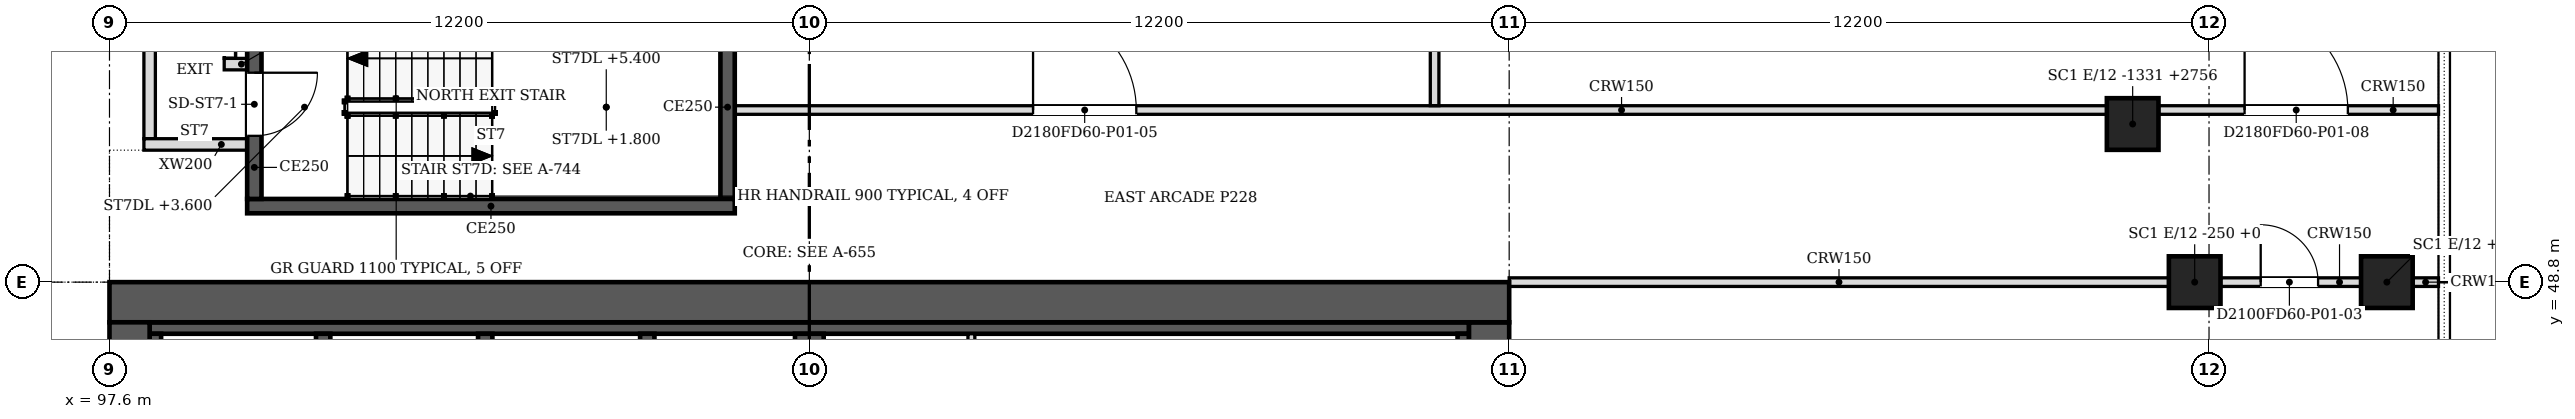
"""IFC4 building model, lengths in metres.
Left out: names, types, materials, properties, quantities, classifications, styles, units other than length and angle.
Written with IfcOpenShell. Run it as: python <this file> out.ifc"""

import sys

from ifc_helpers import new_model, si_unit, direction, frame, frame_2d, origin, origin_2d, place, context, subcontext, project, spatial, rectangle, extrude, source, transform, mapped, element, fill, save


model = new_model("IFC4")
c1 = context("Model", 3, precision=1e-05, world=origin(), true_north=direction((0.0, 1.0)))
c2 = subcontext(c1, "Body", "Model", "MODEL_VIEW")
j1 = project(units=[si_unit("LENGTHUNIT", "METRE"), si_unit("PLANEANGLEUNIT", "RADIAN")], contexts=[c1])
p1 = place(None, origin())
s1 = spatial("IfcSite", under=j1, at=p1, CompositionType="ELEMENT")
p2 = place(p1, origin())
s2 = spatial("IfcBuilding", under=s1, at=p2, CompositionType="ELEMENT")
p3 = place(p2, origin())
s3 = spatial("IfcBuildingStorey", under=s2, at=p3, CompositionType="ELEMENT", Elevation=0.0)
for number, where, z_axis, x_axis in (
    (1, (133.95, 48.8, 0.0), (0.0, 0.0, 1.0), (1.0, 0.0, 0.0)),
    (2, (132.869, 51.556, 0.0), (0.0, 0.0, 1.0), (1.0, 0.0, 0.0)),
    (3, (137.3, 48.8, 0.0), (0.0, 0.0, 1.0), (1.0, 0.0, 0.0)),
):
    element("IfcColumn", number, at=place(p3, frame(where, z_axis=z_axis, x_axis=x_axis)), inside=s3, PredefinedType="COLUMN", context=c2, shape_type="SweptSolid", body=[
        extrude(rectangle(XDim=0.9, YDim=0.9, at=origin_2d()), origin(), (0.0, 0.0, 1.0), 6.95),
    ])
p4 = place(p3, frame((97.95, 37.3, 0.0), z_axis=(0.0, 0.0, 1.0), x_axis=(0.0, 1.0, 0.0)))
e4 = element("IfcWall", 4, at=p4, inside=s3, PredefinedType="SHEAR", context=c2, shape_type="SweptSolid", body=[
    extrude(rectangle(XDim=10.8, YDim=0.7, at=frame_2d((5.4, 0.0))), origin(), (0.0, 0.0, 1.0), 7.2),
])
m1 = source(origin(), c2, "Body", "SweptSolid", [
    extrude(rectangle(XDim=2.1, YDim=2.4, at=frame_2d((1.05, 1.2))), frame((0.0, 0.36, 0.0), z_axis=(0.0, -1.0, 0.0), x_axis=(1.0, 0.0, 0.0)), (0.0, 0.0, 1.0), 0.72),
])
p5 = place(p4, frame((4.5, 0.0, 0.0)))
e5 = element("IfcOpeningElement", 5, at=p5, cuts=e4, PredefinedType="OPENING", context=c2, shape_type="MappedRepresentation", body=[
    mapped(m1, transform((0.0, 0.0, 0.0), scale=1.0)),
])
p6 = place(p3, frame((97.6, 48.45, 0.0), z_axis=(0.0, 0.0, 1.0), x_axis=(1.0, 0.0, 0.0)))
e6 = element("IfcWall", 6, at=p6, inside=s3, PredefinedType="SHEAR", context=c2, shape_type="SweptSolid", body=[
    extrude(rectangle(XDim=24.4, YDim=0.7, at=frame_2d((12.2, 0.0))), origin(), (0.0, 0.0, 1.0), 7.2),
])
p7 = place(p3, frame((121.65, 48.1, 0.0), z_axis=(0.0, 0.0, 1.0), x_axis=(0.0, -1.0, 0.0)))
e7 = element("IfcWall", 7, at=p7, inside=s3, PredefinedType="SHEAR", context=c2, shape_type="SweptSolid", body=[
    extrude(rectangle(XDim=10.8, YDim=0.7, at=frame_2d((5.4, 0.0))), origin(), (0.0, 0.0, 1.0), 7.2),
])
m2 = source(origin(), c2, "Body", "SweptSolid", [
    extrude(rectangle(XDim=2.4, YDim=2.1, at=frame_2d((1.2, 1.05))), frame((0.0, 0.36, 0.0), z_axis=(0.0, -1.0, 0.0), x_axis=(1.0, 0.0, 0.0)), (0.0, 0.0, 1.0), 0.72),
])
p8 = place(p7, frame((3.95, 0.0, 0.0)))
e8 = element("IfcOpeningElement", 8, at=p8, cuts=e7, PredefinedType="OPENING", context=c2, shape_type="MappedRepresentation", body=[
    mapped(m2, transform((0.0, 0.0, 0.0), scale=1.0)),
])
p9 = place(p3, frame((98.3, 48.0, 0.0), z_axis=(0.0, 0.0, 1.0), x_axis=(1.0, 0.0, 0.0)))
e9 = element("IfcWall", 9, at=p9, inside=s3, PredefinedType="SOLIDWALL", context=c2, shape_type="SweptSolid", body=[
    extrude(rectangle(XDim=23.0, YDim=0.2, at=frame_2d((11.5, 0.0))), origin(), (0.0, 0.0, 1.0), 7.2),
])
p10 = place(p3, frame((98.4, 43.9, 0.0), z_axis=(0.0, 0.0, 1.0), x_axis=(0.0, 1.0, 0.0)))
e10 = element("IfcWall", 10, at=p10, inside=s3, PredefinedType="SOLIDWALL", context=c2, shape_type="SweptSolid", body=[
    extrude(rectangle(XDim=4.0, YDim=0.2, at=frame_2d((2.0, 0.0))), origin(), (0.0, 0.0, 1.0), 7.2),
])
p11 = place(p3, frame((121.2, 44.15, 0.0), z_axis=(0.0, 0.0, 1.0), x_axis=(0.0, 1.0, 0.0)))
e11 = element("IfcWall", 11, at=p11, inside=s3, PredefinedType="SOLIDWALL", context=c2, shape_type="SweptSolid", body=[
    extrude(rectangle(XDim=3.75, YDim=0.2, at=frame_2d((1.875, 0.0))), origin(), (0.0, 0.0, 1.0), 7.2),
])
p12 = place(p3, frame((109.8, 45.2, 0.0), z_axis=(0.0, 0.0, 1.0), x_axis=(0.0, 1.0, 0.0)))
e12 = element("IfcWall", 12, at=p12, inside=s3, PredefinedType="SHEAR", context=c2, shape_type="SweptSolid", body=[
    extrude(rectangle(XDim=2.7, YDim=0.5, at=frame_2d((1.35, 0.0))), origin(), (0.0, 0.0, 1.0), 7.2),
])
for number, where, z_axis, x_axis in (
    (13, (101.325, 45.325, 0.0), (0.0, 0.0, 1.0), (0.0, 1.0, 0.0)),
    (14, (104.15, 45.325, 0.0), (0.0, 0.0, 1.0), (0.0, 1.0, 0.0)),
    (15, (106.975, 45.325, 0.0), (0.0, 0.0, 1.0), (0.0, 1.0, 0.0)),
):
    element("IfcWall", number, at=place(p3, frame(where, z_axis=z_axis, x_axis=x_axis)), inside=s3, PredefinedType="SOLIDWALL", context=c2, shape_type="SweptSolid", body=[
        extrude(rectangle(XDim=2.575, YDim=0.25, at=frame_2d((1.288, 0.0))), origin(), (0.0, 0.0, 1.0), 7.2),
    ])
p13 = place(p3, frame((112.625, 45.26, 0.0), z_axis=(0.0, 0.0, 1.0), x_axis=(0.0, 1.0, 0.0)))
e16 = element("IfcWall", 16, at=p13, inside=s3, PredefinedType="PARTITIONING", context=c2, shape_type="SweptSolid", body=[
    extrude(rectangle(XDim=2.64, YDim=0.12, at=frame_2d((1.32, 0.0))), origin(), (0.0, 0.0, 1.0), 6.95),
])
p14 = place(p3, frame((108.5, 50.125, 0.0), z_axis=(0.0, 0.0, 1.0), x_axis=(-1.0, 0.0, 0.0)))
e17 = element("IfcWall", 17, at=p14, inside=s3, PredefinedType="SOLIDWALL", context=c2, shape_type="SweptSolid", body=[
    extrude(rectangle(XDim=8.5, YDim=0.25, at=frame_2d((4.25, 0.0))), origin(), (0.0, 0.0, 1.0), 7.2),
])
p15 = place(p3, frame((100.125, 50.25, 0.0), z_axis=(0.0, 0.0, 1.0), x_axis=(0.0, 1.0, 0.0)))
e18 = element("IfcWall", 18, at=p15, inside=s3, PredefinedType="SOLIDWALL", context=c2, shape_type="SweptSolid", body=[
    extrude(rectangle(XDim=3.2, YDim=0.25, at=frame_2d((1.6, 0.0))), origin(), (0.0, 0.0, 1.0), 7.2),
])
m3 = source(origin(), c2, "Body", "SweptSolid", [
    extrude(rectangle(XDim=1.1, YDim=2.1, at=frame_2d((0.55, 1.05))), frame((0.0, 0.135, 0.0), z_axis=(0.0, -1.0, 0.0), x_axis=(1.0, 0.0, 0.0)), (0.0, 0.0, 1.0), 0.27),
])
p16 = place(p15, frame((1.1, 0.0, 0.0)))
e19 = element("IfcOpeningElement", 19, at=p16, cuts=e18, PredefinedType="OPENING", context=c2, shape_type="MappedRepresentation", body=[
    mapped(m3, transform((0.0, 0.0, 0.0), scale=1.0)),
])
p17 = place(p3, frame((108.375, 53.45, 0.0), z_axis=(0.0, 0.0, 1.0), x_axis=(0.0, -1.0, 0.0)))
e20 = element("IfcWall", 20, at=p17, inside=s3, PredefinedType="SOLIDWALL", context=c2, shape_type="SweptSolid", body=[
    extrude(rectangle(XDim=3.2, YDim=0.25, at=frame_2d((1.6, 0.0))), origin(), (0.0, 0.0, 1.0), 7.2),
])
p18 = place(p3, frame((98.3, 51.3, 0.0), z_axis=(0.0, 0.0, 1.0), x_axis=(0.0, 1.0, 0.0)))
e21 = element("IfcWall", 21, at=p18, inside=s3, PredefinedType="PARTITIONING", context=c2, shape_type="SweptSolid", body=[
    extrude(rectangle(XDim=7.4, YDim=0.2, at=frame_2d((3.7, 0.0))), origin(), (0.0, 0.0, 1.0), 6.115),
])
p19 = place(p3, frame((98.2, 51.2, 0.0), z_axis=(0.0, 0.0, 1.0), x_axis=(1.0, 0.0, 0.0)))
e22 = element("IfcWall", 22, at=p19, inside=s3, PredefinedType="PARTITIONING", context=c2, shape_type="SweptSolid", body=[
    extrude(rectangle(XDim=1.8, YDim=0.2, at=frame_2d((0.9, 0.0))), origin(), (0.0, 0.0, 1.0), 6.115),
])
p20 = place(p3, frame((99.7, 52.7, 0.0), z_axis=(0.0, 0.0, 1.0), x_axis=(0.0, 1.0, 0.0)))
e23 = element("IfcWall", 23, at=p20, inside=s3, PredefinedType="PARTITIONING", context=c2, shape_type="SweptSolid", body=[
    extrude(rectangle(XDim=6.0, YDim=0.2, at=frame_2d((3.0, 0.0))), origin(), (0.0, 0.0, 1.0), 6.115),
])
p21 = place(p3, frame((99.6, 52.6, 0.0), z_axis=(0.0, 0.0, 1.0), x_axis=(1.0, 0.0, 0.0)))
e24 = element("IfcWall", 24, at=p21, inside=s3, PredefinedType="PARTITIONING", context=c2, shape_type="SweptSolid", body=[
    extrude(rectangle(XDim=0.4, YDim=0.2, at=frame_2d((0.2, 0.0))), origin(), (0.0, 0.0, 1.0), 6.115),
])
p22 = place(p3, frame((122.0, 48.8, 0.0), z_axis=(0.0, 0.0, 1.0), x_axis=(1.0, 0.0, 0.0)))
e25 = element("IfcWall", 25, at=p22, inside=s3, PredefinedType="PARTITIONING", context=c2, shape_type="SweptSolid", body=[
    extrude(rectangle(XDim=11.499, YDim=0.15, at=frame_2d((5.75, 0.0))), origin(), (0.0, 0.0, 1.0), 6.115),
])
p23 = place(p3, frame((136.849, 48.8, 0.0), z_axis=(0.0, 0.0, 1.0), x_axis=(-1.0, 0.0, 0.0)))
e26 = element("IfcWall", 26, at=p23, inside=s3, PredefinedType="PARTITIONING", context=c2, shape_type="SweptSolid", body=[
    extrude(rectangle(XDim=2.448, YDim=0.15, at=frame_2d((1.224, 0.0))), origin(), (0.0, 0.0, 1.0), 6.115),
])
m4 = source(origin(), c2, "Body", "SweptSolid", [
    extrude(rectangle(XDim=1.0, YDim=2.1, at=frame_2d((0.5, 1.05))), frame((0.0, 0.085, 0.0), z_axis=(0.0, -1.0, 0.0), x_axis=(1.0, 0.0, 0.0)), (0.0, 0.0, 1.0), 0.17),
])
p24 = place(p23, frame((0.748, 0.0, 0.0)))
e27 = element("IfcOpeningElement", 27, at=p24, cuts=e26, PredefinedType="OPENING", context=c2, shape_type="MappedRepresentation", body=[
    mapped(m4, transform((0.0, 0.0, 0.0), scale=1.0)),
])
p25 = place(p3, frame((137.751, 48.8, 0.0), z_axis=(0.0, 0.0, 1.0), x_axis=(1.0, 0.0, 0.0)))
e28 = element("IfcWall", 28, at=p25, inside=s3, PredefinedType="PARTITIONING", context=c2, shape_type="SweptSolid", body=[
    extrude(rectangle(XDim=0.449, YDim=0.15, at=frame_2d((0.225, 0.0))), origin(), (0.0, 0.0, 1.0), 6.115),
])
p26 = place(p3, frame((108.5, 51.8, 0.0), z_axis=(0.0, 0.0, 1.0), x_axis=(1.0, 0.0, 0.0)))
e29 = element("IfcWall", 29, at=p26, inside=s3, PredefinedType="PARTITIONING", context=c2, shape_type="SweptSolid", body=[
    extrude(rectangle(XDim=23.918, YDim=0.15, at=frame_2d((11.959, 0.0))), origin(), (0.0, 0.0, 1.0), 6.115),
])
m5 = source(origin(), c2, "Body", "SweptSolid", [
    extrude(rectangle(XDim=1.8, YDim=2.1, at=frame_2d((0.9, 1.05))), frame((0.0, 0.085, 0.0), z_axis=(0.0, -1.0, 0.0), x_axis=(1.0, 0.0, 0.0)), (0.0, 0.0, 1.0), 0.17),
])
p27 = place(p26, frame((5.2, 0.0, 0.0)))
e30 = element("IfcOpeningElement", 30, at=p27, cuts=e29, PredefinedType="OPENING", context=c2, shape_type="MappedRepresentation", body=[
    mapped(m5, transform((0.0, 0.0, 0.0), scale=1.0)),
])
p28 = place(p3, frame((133.32, 51.8, 0.0), z_axis=(0.0, 0.0, 1.0), x_axis=(1.0, 0.0, 0.0)))
e31 = element("IfcWall", 31, at=p28, inside=s3, PredefinedType="PARTITIONING", context=c2, shape_type="SweptSolid", body=[
    extrude(rectangle(XDim=4.88, YDim=0.15, at=frame_2d((2.44, 0.0))), origin(), (0.0, 0.0, 1.0), 6.115),
])
p29 = place(p28, frame((1.5, 0.0, 0.0)))
e32 = element("IfcOpeningElement", 32, at=p29, cuts=e31, PredefinedType="OPENING", context=c2, shape_type="MappedRepresentation", body=[
    mapped(m5, transform((0.0, 0.0, 0.0), scale=1.0)),
])
p30 = place(p3, frame((120.7, 51.876, 0.0), z_axis=(0.0, 0.0, 1.0), x_axis=(0.0, 1.0, 0.0)))
e33 = element("IfcWall", 33, at=p30, inside=s3, PredefinedType="PARTITIONING", context=c2, shape_type="SweptSolid", body=[
    extrude(rectangle(XDim=3.823, YDim=0.15, at=frame_2d((1.912, 0.0))), origin(), (0.0, 0.0, 1.0), 6.115),
])
m6 = source(origin(), c2, "Body", "SweptSolid", [
    extrude(rectangle(XDim=1.1, YDim=2.1, at=frame_2d((0.55, 1.05))), frame((0.0, 0.025, 0.0), z_axis=(0.0, -1.0, 0.0), x_axis=(1.0, 0.0, 0.0)), (0.0, 0.0, 1.0), 0.05),
])
p31 = place(p16, origin())
e34 = element("IfcDoor", 34, at=p31, inside=s3, OperationType="SINGLE_SWING_RIGHT", PredefinedType="DOOR", context=c2, shape_type="MappedRepresentation", body=[
    mapped(m6, transform((0.0, 0.0, 0.0), scale=1.0)),
])
fill(e19, e34)
m7 = source(origin(), c2, "Body", "SweptSolid", [
    extrude(rectangle(XDim=1.8, YDim=2.1, at=frame_2d((0.9, 1.05))), frame((0.0, 0.025, 0.0), z_axis=(0.0, -1.0, 0.0), x_axis=(1.0, 0.0, 0.0)), (0.0, 0.0, 1.0), 0.05),
])
p32 = place(p27, origin())
e35 = element("IfcDoor", 35, at=p32, inside=s3, OperationType="DOUBLE_DOOR_SINGLE_SWING", PredefinedType="DOOR", context=c2, shape_type="MappedRepresentation", body=[
    mapped(m7, transform((0.0, 0.0, 0.0), scale=1.0)),
])
fill(e30, e35)
m8 = source(origin(), c2, "Body", "SweptSolid", [
    extrude(rectangle(XDim=1.0, YDim=2.1, at=frame_2d((0.5, 1.05))), frame((0.0, 0.025, 0.0), z_axis=(0.0, -1.0, 0.0), x_axis=(1.0, 0.0, 0.0)), (0.0, 0.0, 1.0), 0.05),
])
p33 = place(p24, origin())
e36 = element("IfcDoor", 36, at=p33, inside=s3, OperationType="SINGLE_SWING_RIGHT", PredefinedType="DOOR", context=c2, shape_type="MappedRepresentation", body=[
    mapped(m8, transform((0.0, 0.0, 0.0), scale=1.0)),
])
fill(e27, e36)
p34 = place(p29, origin())
e37 = element("IfcDoor", 37, at=p34, inside=s3, OperationType="DOUBLE_DOOR_SINGLE_SWING", PredefinedType="DOOR", context=c2, shape_type="MappedRepresentation", body=[
    mapped(m7, transform((0.0, 0.0, 0.0), scale=1.0)),
])
fill(e32, e37)
save(model, sys.argv[1])
